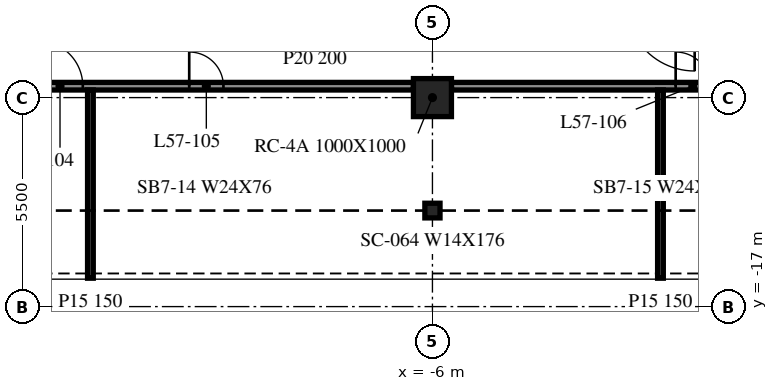
"""IFC4 building model, lengths in metres.
Left out: names, types, materials, properties, quantities, classifications, styles, units other than length and angle.
Written with IfcOpenShell. Run it as: python <this file> out.ifc"""

import sys

from ifc_helpers import new_model, si_unit, direction, frame, frame_2d, origin, origin_2d, place, context, subcontext, project, spatial, rectangle, i_section, extrude, element, fill, save


model = new_model("IFC4")
c1 = context("Model", 3, precision=1e-05, world=origin(), true_north=direction((0.0, 1.0)))
c2 = subcontext(c1, "Body", "Model", "MODEL_VIEW")
j1 = project(units=[si_unit("LENGTHUNIT", "METRE"), si_unit("PLANEANGLEUNIT", "RADIAN")], contexts=[c1])
p1 = place(None, origin())
s1 = spatial("IfcSite", under=j1, at=p1, CompositionType="ELEMENT")
p2 = place(p1, origin())
s2 = spatial("IfcBuilding", under=s1, at=p2, CompositionType="ELEMENT")
p3 = place(p2, frame((0.0, 0.0, 236.2)))
s3 = spatial("IfcBuildingStorey", under=s2, at=p3, CompositionType="ELEMENT", Elevation=236.2)
p4 = place(p3, frame((-6.0, -11.5, -0.34), z_axis=(0.0, 0.0, 1.0), x_axis=(1.0, 0.0, 0.0)))
e1 = element("IfcColumn", 1, at=p4, inside=s3, PredefinedType="COLUMN", context=c2, shape_type="SweptSolid", body=[
    extrude(rectangle(XDim=1.0, YDim=1.0, at=origin_2d()), origin(), (0.0, 0.0, 1.0), 3.8),
])
p5 = place(p3, frame((-6.0, -14.473, -0.34), z_axis=(0.0, 0.0, 1.0), x_axis=(1.0, 0.0, 0.0)))
e2 = element("IfcColumn", 2, at=p5, inside=s3, PredefinedType="COLUMN", context=c2, shape_type="SweptSolid", body=[
    extrude(i_section(OverallWidth=0.399, OverallDepth=0.386, WebThickness=0.021, FlangeThickness=0.033, at=origin_2d()), origin(), (0.0, 0.0, 1.0), 3.8),
])
p6 = place(p3, frame((-17.5, -11.2, 0.0), z_axis=(0.0, 0.0, 1.0), x_axis=(1.0, 0.0, 0.0)))
e3 = element("IfcWall", 3, at=p6, inside=s3, PredefinedType="PARTITIONING", context=c2, shape_type="SweptSolid", body=[
    extrude(rectangle(XDim=11.0, YDim=0.2, at=frame_2d((5.5, 0.0))), origin(), (0.0, 0.0, 1.0), 3.46),
])
p7 = place(p6, frame((1.1, 0.0, 0.0)))
e4 = element("IfcOpeningElement", 4, at=p7, cuts=e3, PredefinedType="OPENING", context=c2, shape_type="SweptSolid", body=[
    extrude(rectangle(XDim=1.2, YDim=2.1, at=frame_2d((0.6, 1.05))), frame((0.0, 0.11, 0.0), z_axis=(0.0, -1.0, 0.0), x_axis=(1.0, 0.0, 0.0)), (0.0, 0.0, 1.0), 0.22),
])
p8 = place(p6, frame((5.1, 0.0, 0.0)))
e5 = element("IfcOpeningElement", 5, at=p8, cuts=e3, PredefinedType="OPENING", context=c2, shape_type="SweptSolid", body=[
    extrude(rectangle(XDim=0.9, YDim=2.1, at=frame_2d((0.45, 1.05))), frame((0.0, 0.11, 0.0), z_axis=(0.0, -1.0, 0.0), x_axis=(1.0, 0.0, 0.0)), (0.0, 0.0, 1.0), 0.22),
])
p9 = place(p3, frame((-5.5, -11.2, 0.0), z_axis=(0.0, 0.0, 1.0), x_axis=(1.0, 0.0, 0.0)))
e6 = element("IfcWall", 6, at=p9, inside=s3, PredefinedType="PARTITIONING", context=c2, shape_type="SweptSolid", body=[
    extrude(rectangle(XDim=11.0, YDim=0.2, at=frame_2d((5.5, 0.0))), origin(), (0.0, 0.0, 1.0), 3.46),
])
p10 = place(p9, frame((5.9, 0.0, 0.0)))
e7 = element("IfcOpeningElement", 7, at=p10, cuts=e6, PredefinedType="OPENING", context=c2, shape_type="SweptSolid", body=[
    extrude(rectangle(XDim=0.9, YDim=2.1, at=frame_2d((0.45, 1.05))), frame((0.0, 0.11, 0.0), z_axis=(0.0, -1.0, 0.0), x_axis=(1.0, 0.0, 0.0)), (0.0, 0.0, 1.0), 0.22),
])
for number, where, z_axis, x_axis in (
    (8, (-15.0, -16.253, 0.0), (0.0, 0.0, 1.0), (0.0, 1.0, 0.0)),
    (9, (0.0, -16.253, 0.0), (0.0, 0.0, 1.0), (0.0, 1.0, 0.0)),
):
    element("IfcWall", number, at=place(p3, frame(where, z_axis=z_axis, x_axis=x_axis)), inside=s3, PredefinedType="PARTITIONING", context=c2, shape_type="SweptSolid", body=[
        extrude(rectangle(XDim=4.953, YDim=0.15, at=frame_2d((2.477, 0.0))), origin(), (0.0, 0.0, 1.0), 3.46),
    ])
p11 = place(p7, origin())
e10 = element("IfcDoor", 10, at=p11, inside=s3, OperationType="SINGLE_SWING_RIGHT", PredefinedType="DOOR", context=c2, shape_type="SweptSolid", body=[
    extrude(rectangle(XDim=1.2, YDim=2.1, at=frame_2d((0.6, 1.05))), frame((0.0, 0.025, 0.0), z_axis=(0.0, -1.0, 0.0), x_axis=(1.0, 0.0, 0.0)), (0.0, 0.0, 1.0), 0.05),
])
fill(e4, e10)
p12 = place(p8, origin())
e11 = element("IfcDoor", 11, at=p12, inside=s3, OperationType="SINGLE_SWING_LEFT", PredefinedType="DOOR", context=c2, shape_type="SweptSolid", body=[
    extrude(rectangle(XDim=0.9, YDim=2.1, at=frame_2d((0.45, 1.05))), frame((0.0, 0.025, 0.0), z_axis=(0.0, -1.0, 0.0), x_axis=(1.0, 0.0, 0.0)), (0.0, 0.0, 1.0), 0.05),
])
fill(e5, e11)
p13 = place(p10, origin())
e12 = element("IfcDoor", 12, at=p13, inside=s3, OperationType="SINGLE_SWING_LEFT", PredefinedType="DOOR", context=c2, shape_type="SweptSolid", body=[
    extrude(rectangle(XDim=0.9, YDim=2.1, at=frame_2d((0.45, 1.05))), frame((0.0, 0.025, 0.0), z_axis=(0.0, -1.0, 0.0), x_axis=(1.0, 0.0, 0.0)), (0.0, 0.0, 1.0), 0.05),
])
fill(e7, e12)
save(model, sys.argv[1])
